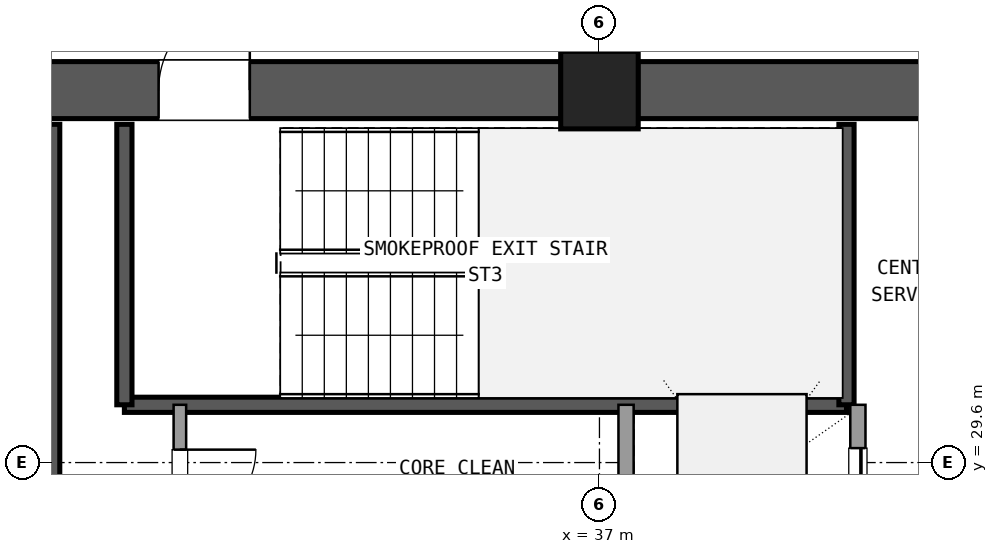
"""IFC4 building model, lengths in metres.
Left out: names, types, materials, properties, quantities, classifications, styles, units other than length and angle.
Written with IfcOpenShell. Run it as: python <this file> out.ifc"""

import sys

from ifc_helpers import new_model, si_unit, direction, frame, frame_2d, origin, origin_2d, place, context, subcontext, project, spatial, rectangle, extrude, element, fill, save


model = new_model("IFC4")
c1 = context("Model", 3, precision=1e-05, world=origin(), true_north=direction((0.0, 1.0)))
c2 = subcontext(c1, "Body", "Model", "MODEL_VIEW")
j1 = project(units=[si_unit("LENGTHUNIT", "METRE"), si_unit("PLANEANGLEUNIT", "RADIAN")], contexts=[c1])
p1 = place(None, origin())
s1 = spatial("IfcSite", under=j1, at=p1, CompositionType="ELEMENT")
p2 = place(p1, origin())
s2 = spatial("IfcBuilding", under=s1, at=p2, CompositionType="ELEMENT")
p3 = place(p2, frame((0.0, 0.0, 163.62)))
s3 = spatial("IfcBuildingStorey", under=s2, at=p3, CompositionType="ELEMENT", Elevation=163.62)
p4 = place(p3, frame((37.0, 34.5, 0.0), z_axis=(0.0, 0.0, 1.0), x_axis=(1.0, 0.0, 0.0)))
e1 = element("IfcColumn", 1, at=p4, inside=s3, PredefinedType="COLUMN", context=c2, shape_type="SweptSolid", body=[
    extrude(rectangle(XDim=1.02, YDim=1.02, at=origin_2d()), origin(), (0.0, 0.0, 1.0), 3.6),
])
p5 = place(p3, frame((47.695, 34.5, 0.0), z_axis=(0.0, 0.0, 1.0), x_axis=(-1.0, 0.0, 0.0)))
e2 = element("IfcWall", 2, at=p5, inside=s3, PredefinedType="SHEAR", context=c2, shape_type="SweptSolid", body=[
    extrude(rectangle(XDim=10.19, YDim=0.75, at=frame_2d((5.095, 0.0))), origin(), (0.0, 0.0, 1.0), 3.32),
])
p6 = place(p5, frame((4.595, 0.0, 0.0)))
e3 = element("IfcOpeningElement", 3, at=p6, cuts=e2, PredefinedType="OPENING", context=c2, shape_type="SweptSolid", body=[
    extrude(rectangle(XDim=1.6, YDim=2.2, at=frame_2d((0.8, 1.1))), frame((0.0, 0.385, 0.0), z_axis=(0.0, -1.0, 0.0), x_axis=(1.0, 0.0, 0.0)), (0.0, 0.0, 1.0), 0.77),
])
p7 = place(p3, frame((36.495, 34.5, 0.0), z_axis=(0.0, 0.0, 1.0), x_axis=(-1.0, 0.0, 0.0)))
e4 = element("IfcWall", 4, at=p7, inside=s3, PredefinedType="SHEAR", context=c2, shape_type="SweptSolid", body=[
    extrude(rectangle(XDim=10.19, YDim=0.75, at=frame_2d((5.095, 0.0))), origin(), (0.0, 0.0, 1.0), 3.32),
])
p8 = place(p7, frame((4.095, 0.0, 0.0)))
e5 = element("IfcOpeningElement", 5, at=p8, cuts=e4, PredefinedType="OPENING", context=c2, shape_type="SweptSolid", body=[
    extrude(rectangle(XDim=1.2, YDim=2.15, at=frame_2d((0.6, 1.075))), frame((0.0, 0.385, 0.0), z_axis=(0.0, -1.0, 0.0), x_axis=(1.0, 0.0, 0.0)), (0.0, 0.0, 1.0), 0.77),
])
p9 = place(p3, frame((29.8, 24.65, 0.0), z_axis=(0.0, 0.0, 1.0), x_axis=(0.0, 1.0, 0.0)))
e6 = element("IfcWall", 6, at=p9, inside=s3, PredefinedType="SHEAR", context=c2, shape_type="SweptSolid", body=[
    extrude(rectangle(XDim=9.4, YDim=0.2, at=frame_2d((4.7, 0.0))), origin(), (0.0, 0.0, 1.0), 3.32),
])
p10 = place(p3, frame((30.75, 30.36, 0.0), z_axis=(0.0, 0.0, 1.0), x_axis=(1.0, 0.0, 0.0)))
e7 = element("IfcWall", 7, at=p10, inside=s3, PredefinedType="SHEAR", context=c2, shape_type="SweptSolid", body=[
    extrude(rectangle(XDim=9.5, YDim=0.2, at=frame_2d((4.75, 0.0))), origin(), (0.0, 0.0, 1.0), 3.32),
])
for number, where, z_axis, x_axis in (
    (8, (30.75, 30.36, 0.0), (0.0, 0.0, 1.0), (0.0, 1.0, 0.0)),
    (9, (40.25, 30.36, 0.0), (0.0, 0.0, 1.0), (0.0, 1.0, 0.0)),
):
    element("IfcWall", number, at=place(p3, frame(where, z_axis=z_axis, x_axis=x_axis)), inside=s3, PredefinedType="SHEAR", context=c2, shape_type="SweptSolid", body=[
        extrude(rectangle(XDim=3.69, YDim=0.2, at=frame_2d((1.845, 0.0))), origin(), (0.0, 0.0, 1.0), 3.32),
    ])
p11 = place(p3, frame((37.35, 23.54, 0.0), z_axis=(0.0, 0.0, 1.0), x_axis=(0.0, 1.0, 0.0)))
e10 = element("IfcWall", 10, at=p11, inside=s3, PredefinedType="SOLIDWALL", context=c2, shape_type="SweptSolid", body=[
    extrude(rectangle(XDim=6.82, YDim=0.2, at=frame_2d((3.41, 0.0))), origin(), (0.0, 0.0, 1.0), 2.61),
])
p12 = place(p3, frame((40.4, 23.54, 0.0), z_axis=(0.0, 0.0, 1.0), x_axis=(0.0, 1.0, 0.0)))
e11 = element("IfcWall", 11, at=p12, inside=s3, PredefinedType="SOLIDWALL", context=c2, shape_type="SweptSolid", body=[
    extrude(rectangle(XDim=6.82, YDim=0.2, at=frame_2d((3.41, 0.0))), origin(), (0.0, 0.0, 1.0), 2.61),
])
p13 = place(p12, frame((0.35, 0.0, 0.0)))
e12 = element("IfcOpeningElement", 12, at=p13, cuts=e11, PredefinedType="OPENING", context=c2, shape_type="SweptSolid", body=[
    extrude(rectangle(XDim=1.4, YDim=2.2, at=frame_2d((0.7, 1.1))), frame((0.0, 0.11, 0.0), z_axis=(0.0, -1.0, 0.0), x_axis=(1.0, 0.0, 0.0)), (0.0, 0.0, 1.0), 0.22),
])
p14 = place(p12, frame((2.65, 0.0, 0.0)))
e13 = element("IfcOpeningElement", 13, at=p14, cuts=e11, PredefinedType="OPENING", context=c2, shape_type="SweptSolid", body=[
    extrude(rectangle(XDim=1.4, YDim=2.2, at=frame_2d((0.7, 1.1))), frame((0.0, 0.11, 0.0), z_axis=(0.0, -1.0, 0.0), x_axis=(1.0, 0.0, 0.0)), (0.0, 0.0, 1.0), 0.22),
])
p15 = place(p12, frame((4.85, 0.0, 0.0)))
e14 = element("IfcOpeningElement", 14, at=p15, cuts=e11, PredefinedType="OPENING", context=c2, shape_type="SweptSolid", body=[
    extrude(rectangle(XDim=1.4, YDim=2.2, at=frame_2d((0.7, 1.1))), frame((0.0, 0.11, 0.0), z_axis=(0.0, -1.0, 0.0), x_axis=(1.0, 0.0, 0.0)), (0.0, 0.0, 1.0), 0.22),
])
p16 = place(p3, frame((31.48, 26.32, 0.0), z_axis=(0.0, 0.0, 1.0), x_axis=(0.0, 1.0, 0.0)))
e15 = element("IfcWall", 15, at=p16, inside=s3, PredefinedType="PLUMBINGWALL", context=c2, shape_type="SweptSolid", body=[
    extrude(rectangle(XDim=4.04, YDim=0.165, at=frame_2d((2.02, 0.0))), origin(), (0.0, 0.0, 1.0), 2.61),
])
p17 = place(p16, frame((0.5, 0.0, 0.0)))
e16 = element("IfcOpeningElement", 16, at=p17, cuts=e15, PredefinedType="OPENING", context=c2, shape_type="SweptSolid", body=[
    extrude(rectangle(XDim=0.95, YDim=2.1, at=frame_2d((0.475, 1.05))), frame((0.0, 0.093, 0.0), z_axis=(0.0, -1.0, 0.0), x_axis=(1.0, 0.0, 0.0)), (0.0, 0.0, 1.0), 0.185),
])
p18 = place(p16, frame((2.45, 0.0, 0.0)))
e17 = element("IfcOpeningElement", 17, at=p18, cuts=e15, PredefinedType="OPENING", context=c2, shape_type="SweptSolid", body=[
    extrude(rectangle(XDim=1.0, YDim=2.15, at=frame_2d((0.5, 1.075))), frame((0.0, 0.093, 0.0), z_axis=(0.0, -1.0, 0.0), x_axis=(1.0, 0.0, 0.0)), (0.0, 0.0, 1.0), 0.185),
])
p19 = place(p3, frame((37.0, 34.95, 0.0), z_axis=(0.0, 0.0, 1.0), x_axis=(0.0, 1.0, 0.0)))
e18 = element("IfcWall", 18, at=p19, inside=s3, PredefinedType="PARTITIONING", context=c2, shape_type="SweptSolid", body=[
    extrude(rectangle(XDim=3.21, YDim=0.18, at=frame_2d((1.605, 0.0))), origin(), (0.0, 0.0, 1.0), 2.61),
])
p20 = place(p19, frame((0.605, 0.0, 0.0)))
e19 = element("IfcOpeningElement", 19, at=p20, cuts=e18, PredefinedType="OPENING", context=c2, shape_type="SweptSolid", body=[
    extrude(rectangle(XDim=2.0, YDim=2.2, at=frame_2d((1.0, 1.1))), frame((0.0, 0.1, 0.0), z_axis=(0.0, -1.0, 0.0), x_axis=(1.0, 0.0, 0.0)), (0.0, 0.0, 1.0), 0.2),
])
p21 = place(p8, frame((1.2, 0.0, 0.0), z_axis=(0.0, 0.0, 1.0), x_axis=(-1.0, 0.0, 0.0)))
e20 = element("IfcDoor", 20, at=p21, inside=s3, OperationType="SINGLE_SWING_LEFT", PredefinedType="DOOR", context=c2, shape_type="SweptSolid", body=[
    extrude(rectangle(XDim=1.2, YDim=2.15, at=frame_2d((0.6, 1.075))), frame((0.0, 0.025, 0.0), z_axis=(0.0, -1.0, 0.0), x_axis=(1.0, 0.0, 0.0)), (0.0, 0.0, 1.0), 0.05),
])
fill(e5, e20)
p22 = place(p15, origin())
e21 = element("IfcDoor", 21, at=p22, inside=s3, OperationType="SLIDING_TO_RIGHT", PredefinedType="DOOR", context=c2, shape_type="SweptSolid", body=[
    extrude(rectangle(XDim=1.4, YDim=2.2, at=frame_2d((0.7, 1.1))), frame((0.0, 0.025, 0.0), z_axis=(0.0, -1.0, 0.0), x_axis=(1.0, 0.0, 0.0)), (0.0, 0.0, 1.0), 0.05),
])
fill(e14, e21)
p23 = place(p18, frame((1.0, 0.0, 0.0), z_axis=(0.0, 0.0, 1.0), x_axis=(-1.0, 0.0, 0.0)))
e22 = element("IfcDoor", 22, at=p23, inside=s3, OperationType="SINGLE_SWING_RIGHT", PredefinedType="DOOR", context=c2, shape_type="SweptSolid", body=[
    extrude(rectangle(XDim=1.0, YDim=2.15, at=frame_2d((0.5, 1.075))), frame((0.0, 0.025, 0.0), z_axis=(0.0, -1.0, 0.0), x_axis=(1.0, 0.0, 0.0)), (0.0, 0.0, 1.0), 0.05),
])
fill(e17, e22)
save(model, sys.argv[1])
